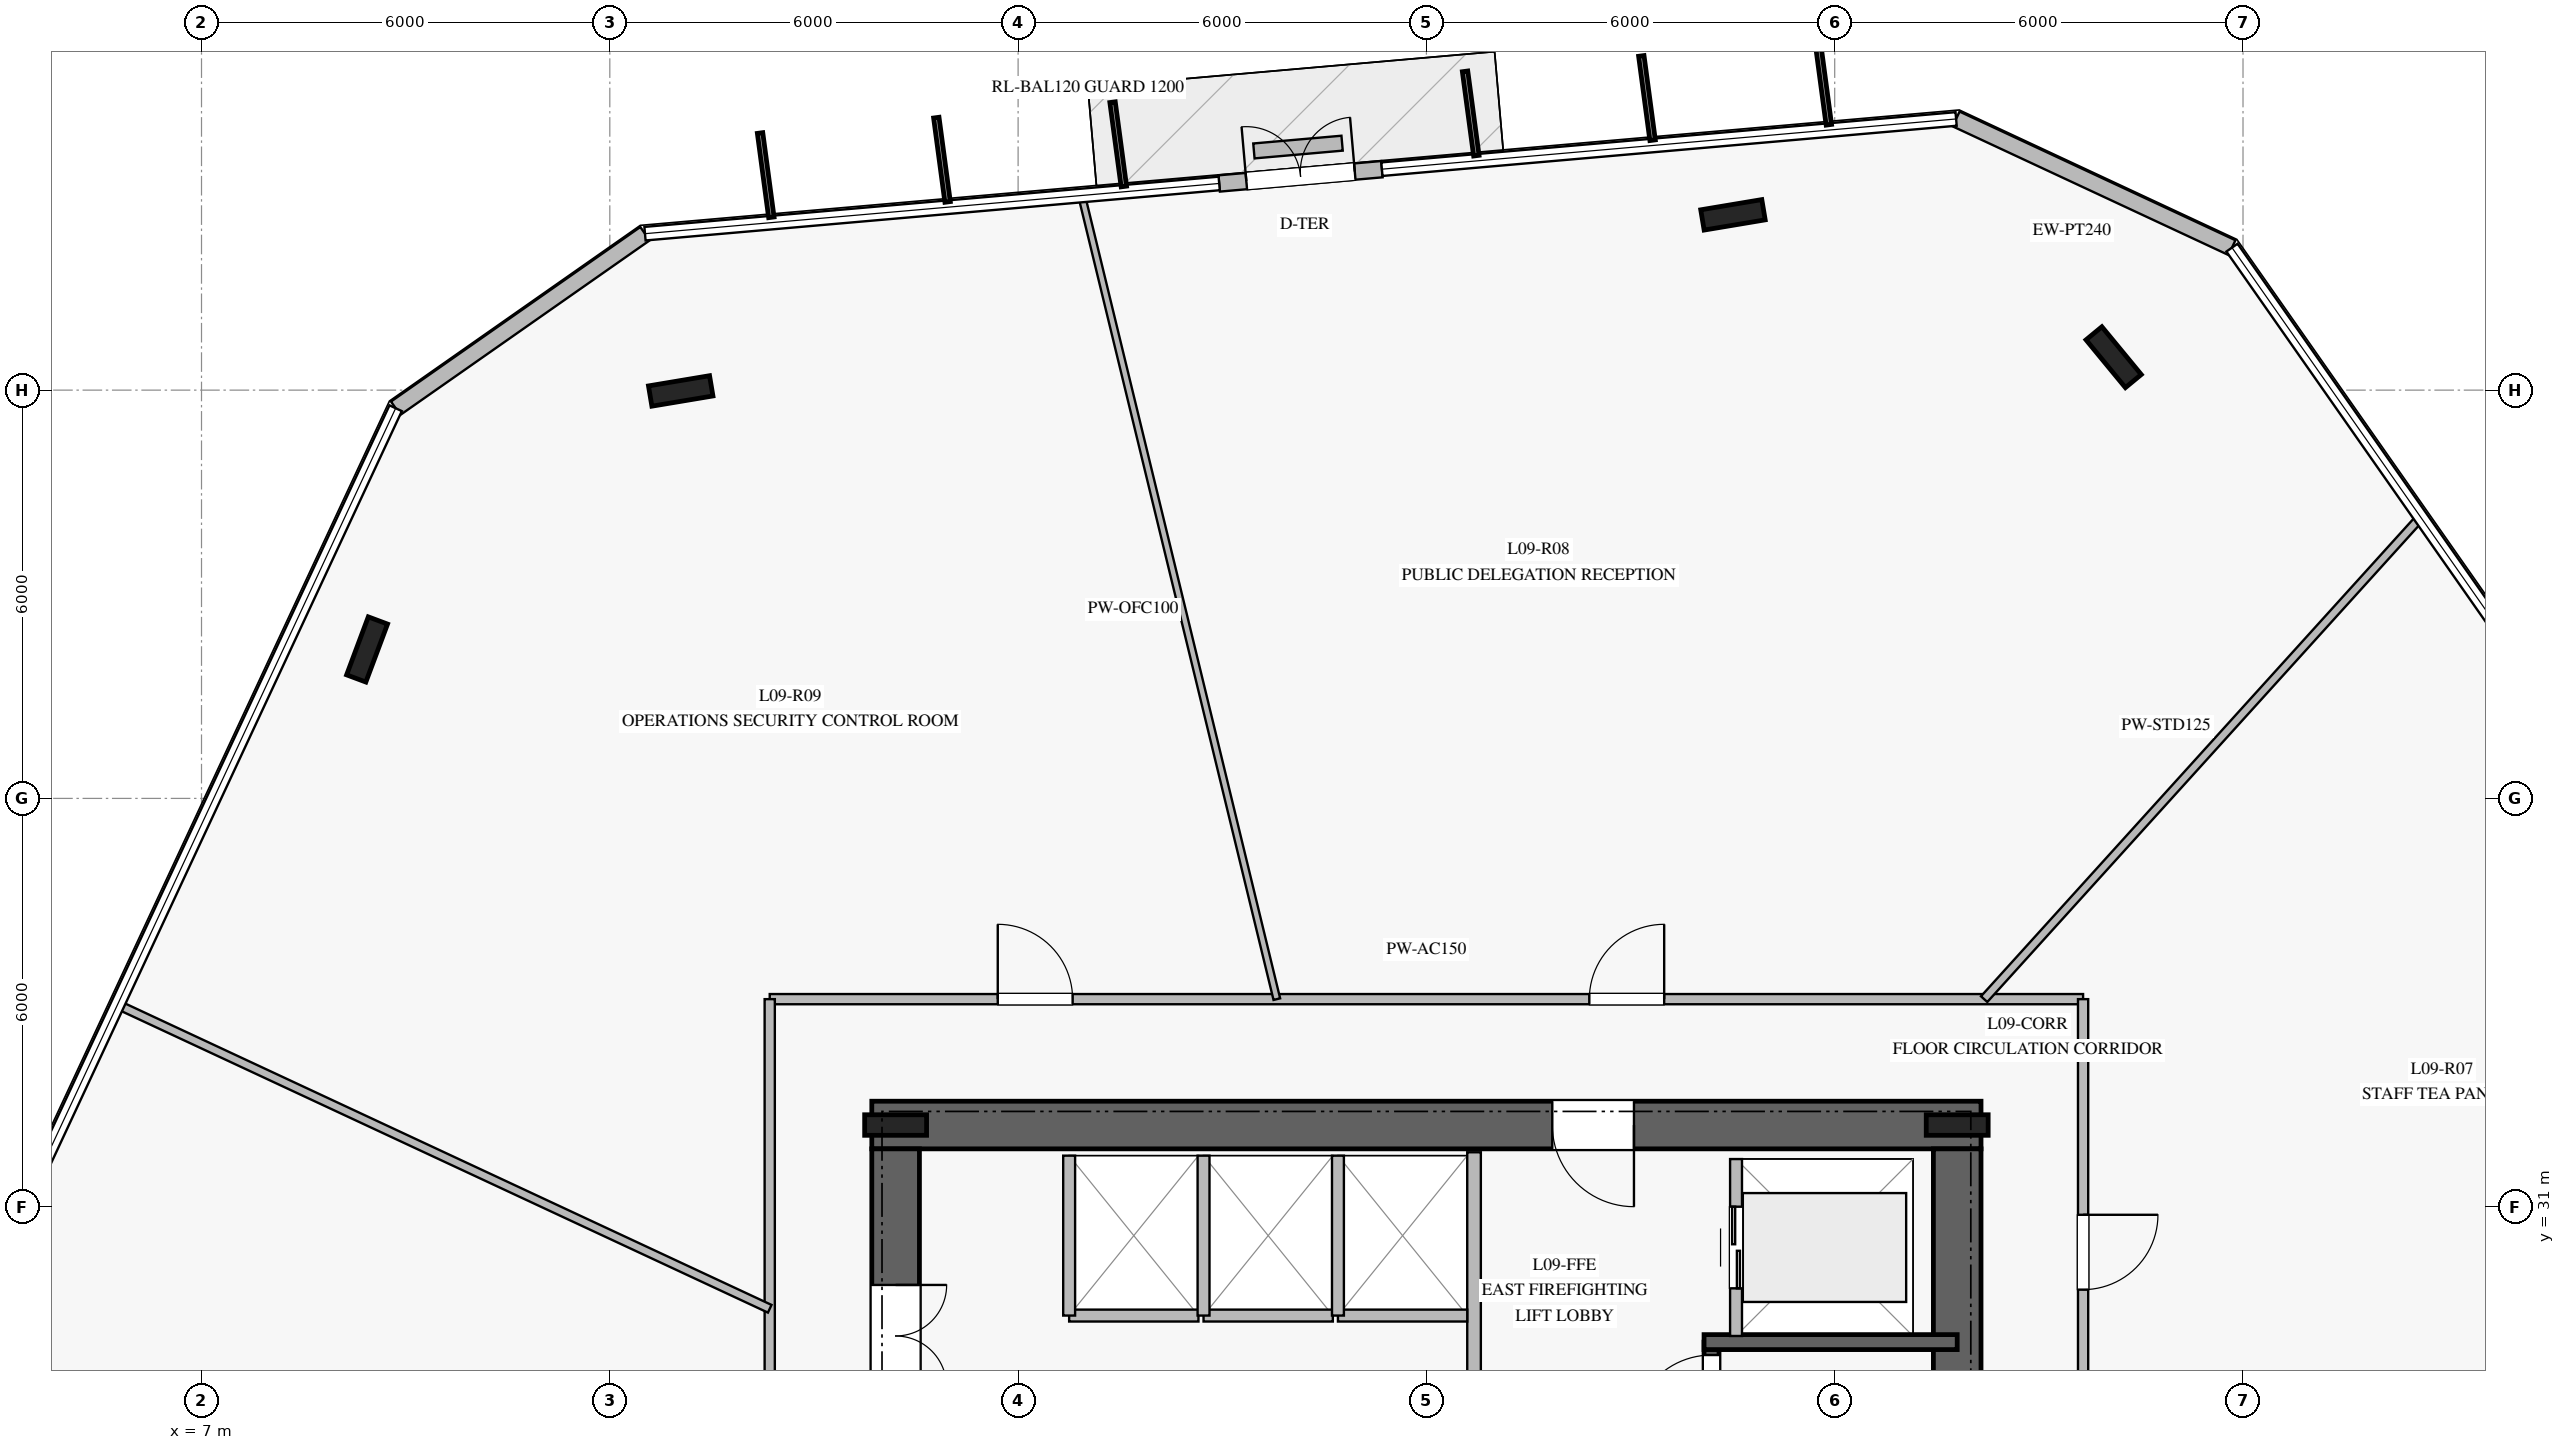
"""IFC4 building model, lengths in metres.
Left out: names, types, materials, properties, quantities, classifications, styles, units other than length and angle.
Written with IfcOpenShell. Run it as: python <this file> out.ifc"""

import sys

from ifc_helpers import new_model, si_unit, direction, frame, frame_2d, origin, origin_2d, place, context, subcontext, project, spatial, rectangle, i_section, extrude, element, fill, save


model = new_model("IFC4")
c1 = context("Model", 3, precision=1e-05, world=origin(), true_north=direction((0.0, 1.0)))
c2 = subcontext(c1, "Body", "Model", "MODEL_VIEW")
j1 = project(units=[si_unit("LENGTHUNIT", "METRE"), si_unit("PLANEANGLEUNIT", "RADIAN")], contexts=[c1])
p1 = place(None, origin())
s1 = spatial("IfcSite", under=j1, at=p1, CompositionType="ELEMENT")
p2 = place(p1, origin())
s2 = spatial("IfcBuilding", under=s1, at=p2, CompositionType="ELEMENT")
p3 = place(p2, frame((0.0, 0.0, 40.0)))
s3 = spatial("IfcBuildingStorey", under=s2, at=p3, CompositionType="ELEMENT", Elevation=40.0)
p4 = place(p3, frame((33.15, 32.2, 0.0), z_axis=(0.0, 0.0, 1.0), x_axis=(-1.0, 0.0, 0.0)))
e1 = element("IfcWall", 1, at=p4, inside=s3, PredefinedType="SHEAR", context=c2, shape_type="SweptSolid", body=[
    extrude(rectangle(XDim=16.3, YDim=0.7, at=frame_2d((8.15, 0.0))), origin(), (0.0, 0.0, 1.0), 3.76),
])
p5 = place(p4, frame((5.1, 0.0, 0.0)))
e2 = element("IfcOpeningElement", 2, at=p5, cuts=e1, PredefinedType="OPENING", context=c2, shape_type="SweptSolid", body=[
    extrude(rectangle(XDim=1.2, YDim=2.25, at=frame_2d((0.6, 1.125))), frame((0.0, 0.36, 0.0), z_axis=(0.0, -1.0, 0.0), x_axis=(1.0, 0.0, 0.0)), (0.0, 0.0, 1.0), 0.72),
])
p6 = place(p3, frame((17.2, 31.85, 0.0), z_axis=(0.0, 0.0, 1.0), x_axis=(0.0, -1.0, 0.0)))
e3 = element("IfcWall", 3, at=p6, inside=s3, PredefinedType="SHEAR", context=c2, shape_type="SweptSolid", body=[
    extrude(rectangle(XDim=13.7, YDim=0.7, at=frame_2d((6.85, 0.0))), origin(), (0.0, 0.0, 1.0), 3.76),
])
p7 = place(p6, frame((2.0, 0.0, 0.0)))
e4 = element("IfcOpeningElement", 4, at=p7, cuts=e3, PredefinedType="OPENING", context=c2, shape_type="SweptSolid", body=[
    extrude(rectangle(XDim=1.5, YDim=2.2, at=frame_2d((0.75, 1.1))), frame((0.0, 0.36, 0.0), z_axis=(0.0, -1.0, 0.0), x_axis=(1.0, 0.0, 0.0)), (0.0, 0.0, 1.0), 0.72),
])
p8 = place(p3, frame((32.8, 18.15, 0.0), z_axis=(0.0, 0.0, 1.0), x_axis=(0.0, 1.0, 0.0)))
e5 = element("IfcWall", 5, at=p8, inside=s3, PredefinedType="SHEAR", context=c2, shape_type="SweptSolid", body=[
    extrude(rectangle(XDim=13.7, YDim=0.7, at=frame_2d((6.85, 0.0))), origin(), (0.0, 0.0, 1.0), 3.76),
])
for number, where, z_axis, x_axis in (
    (6, (32.8, 32.2, 0.0), (0.0, 0.0, 1.0), (1.0, 0.0, 0.0)),
    (7, (17.2, 32.2, 0.0), (0.0, 0.0, 1.0), (1.0, 0.0, 0.0)),
):
    element("IfcColumn", number, at=place(p3, frame(where, z_axis=z_axis, x_axis=x_axis)), inside=s3, PredefinedType="COLUMN", context=c2, shape_type="SweptSolid", body=[
        extrude(i_section(OverallWidth=0.302, OverallDepth=0.91, WebThickness=0.021, FlangeThickness=0.04, at=origin_2d()), origin(), (0.0, 0.0, 1.0), 4.0),
    ])
p9 = place(p3, frame((29.19, 21.79, 0.0), z_axis=(0.0, 0.0, 1.0), x_axis=(0.0, 1.0, 0.0)))
e8 = element("IfcWall", 8, at=p9, inside=s3, PredefinedType="SOLIDWALL", context=c2, shape_type="SweptSolid", body=[
    extrude(rectangle(XDim=7.22, YDim=0.22, at=frame_2d((3.61, 0.0))), origin(), (0.0, 0.0, 1.0), 3.76),
])
p10 = place(p9, frame((5.88, 0.0, 0.0)))
e9 = element("IfcOpeningElement", 9, at=p10, cuts=e8, PredefinedType="OPENING", context=c2, shape_type="SweptSolid", body=[
    extrude(rectangle(XDim=1.15, YDim=2.2, at=frame_2d((0.575, 1.1))), frame((0.0, 0.12, 0.0), z_axis=(0.0, -1.0, 0.0), x_axis=(1.0, 0.0, 0.0)), (0.0, 0.0, 1.0), 0.24),
])
p11 = place(p3, frame((29.08, 29.01, 0.0), z_axis=(0.0, 0.0, 1.0), x_axis=(1.0, 0.0, 0.0)))
e10 = element("IfcWall", 10, at=p11, inside=s3, PredefinedType="SOLIDWALL", context=c2, shape_type="SweptSolid", body=[
    extrude(rectangle(XDim=3.72, YDim=0.22, at=frame_2d((1.86, 0.0))), origin(), (0.0, 0.0, 1.0), 3.76),
])
for number, where, z_axis, x_axis in (
    (11, (35.099, 43.484, 0.0), (0.0, 0.0, 1.0), (-0.636, 0.772, 0.0)),
    (12, (29.505, 45.576, 0.0), (0.0, 0.0, 1.0), (0.986, 0.165, 0.0)),
    (13, (14.042, 42.988, 0.0), (0.0, 0.0, 1.0), (0.986, 0.165, 0.0)),
    (14, (9.433, 39.189, 0.0), (0.0, 0.0, 1.0), (0.35, 0.937, 0.0)),
):
    element("IfcColumn", number, at=place(p3, frame(where, z_axis=z_axis, x_axis=x_axis)), inside=s3, PredefinedType="COLUMN", context=c2, shape_type="SweptSolid", body=[
        extrude(i_section(OverallWidth=0.302, OverallDepth=0.91, WebThickness=0.021, FlangeThickness=0.04, at=origin_2d()), origin(), (0.0, 0.0, 1.0), 4.0),
    ])
p12 = place(p3, frame((36.838, 45.094, 0.0), z_axis=(0.0, 0.0, 1.0), x_axis=(-0.906245873292, 0.422751010811, 0.0)))
e15 = element("IfcWall", 15, at=p12, inside=s3, PredefinedType="STANDARD", context=c2, shape_type="SweptSolid", body=[
    extrude(rectangle(XDim=4.473, YDim=0.24, at=frame_2d((2.237, 0.0))), origin(), (0.0, 0.0, 1.0), 3.76),
])
p13 = place(p3, frame((24.346, 46.247, 0.0), z_axis=(0.0, 0.0, 1.0), x_axis=(-0.996166175014, -0.087481150874, 0.0)))
e16 = element("IfcWall", 16, at=p13, inside=s3, PredefinedType="STANDARD", context=c2, shape_type="SweptSolid", body=[
    extrude(rectangle(XDim=2.4, YDim=0.24, at=frame_2d((1.2, 0.0))), origin(), (0.0, 0.0, 1.0), 3.76),
])
p14 = place(p13, frame((0.4, 0.0, 0.0)))
e17 = element("IfcOpeningElement", 17, at=p14, cuts=e16, PredefinedType="OPENING", context=c2, shape_type="SweptSolid", body=[
    extrude(rectangle(XDim=1.6, YDim=2.25, at=frame_2d((0.8, 1.125))), frame((0.0, 0.13, 0.0), z_axis=(0.0, -1.0, 0.0), x_axis=(1.0, 0.0, 0.0)), (0.0, 0.0, 1.0), 0.26),
])
p15 = place(p3, frame((13.517, 45.299, 0.0), z_axis=(0.0, 0.0, 1.0), x_axis=(-0.819196018056, -0.573513630178, 0.0)))
e18 = element("IfcWall", 18, at=p15, inside=s3, PredefinedType="STANDARD", context=c2, shape_type="SweptSolid", body=[
    extrude(rectangle(XDim=4.473, YDim=0.24, at=frame_2d((2.236, 0.0))), origin(), (0.0, 0.0, 1.0), 3.76),
])
p16 = place(p3, frame((23.761, 46.629, 0.0), z_axis=(0.0, 0.0, 1.0), x_axis=(-0.996152048595, -0.087641862602, 0.0)))
e19 = element("IfcWall", 19, at=p16, inside=s3, PredefinedType="USERDEFINED", context=c2, shape_type="SweptSolid", body=[
    extrude(rectangle(XDim=1.301, YDim=0.22, at=frame_2d((0.65, 0.0))), origin(), (0.0, 0.0, 1.0), 0.4),
])
p17 = place(p3, frame((25.7, 26.65, 0.0), z_axis=(0.0, 0.0, 1.0), x_axis=(0.0, 1.0, 0.0)))
e20 = element("IfcWall", 20, at=p17, inside=s3, PredefinedType="PARTITIONING", context=c2, shape_type="SweptSolid", body=[
    extrude(rectangle(XDim=5.15, YDim=0.2, at=frame_2d((2.575, 0.0))), origin(), (0.0, 0.0, 1.0), 3.76),
])
p18 = place(p3, frame((19.75, 29.4, 0.0), z_axis=(0.0, 0.0, 1.0), x_axis=(1.0, 0.0, 0.0)))
e21 = element("IfcWall", 21, at=p18, inside=s3, PredefinedType="PARTITIONING", context=c2, shape_type="SweptSolid", body=[
    extrude(rectangle(XDim=1.9, YDim=0.175, at=frame_2d((0.95, 0.0))), origin(), (0.0, 0.0, 1.0), 3.76),
])
p19 = place(p3, frame((19.75, 29.4, 0.0), z_axis=(0.0, 0.0, 1.0), x_axis=(0.0, 1.0, 0.0)))
e22 = element("IfcWall", 22, at=p19, inside=s3, PredefinedType="PARTITIONING", context=c2, shape_type="SweptSolid", body=[
    extrude(rectangle(XDim=2.35, YDim=0.175, at=frame_2d((1.175, 0.0))), origin(), (0.0, 0.0, 1.0), 3.76),
])
p20 = place(p3, frame((21.725, 29.4, 0.0), z_axis=(0.0, 0.0, 1.0), x_axis=(1.0, 0.0, 0.0)))
e23 = element("IfcWall", 23, at=p20, inside=s3, PredefinedType="PARTITIONING", context=c2, shape_type="SweptSolid", body=[
    extrude(rectangle(XDim=1.9, YDim=0.175, at=frame_2d((0.95, 0.0))), origin(), (0.0, 0.0, 1.0), 3.76),
])
p21 = place(p3, frame((21.725, 29.4, 0.0), z_axis=(0.0, 0.0, 1.0), x_axis=(0.0, 1.0, 0.0)))
e24 = element("IfcWall", 24, at=p21, inside=s3, PredefinedType="PARTITIONING", context=c2, shape_type="SweptSolid", body=[
    extrude(rectangle(XDim=2.35, YDim=0.175, at=frame_2d((1.175, 0.0))), origin(), (0.0, 0.0, 1.0), 3.76),
])
p22 = place(p3, frame((23.7, 29.4, 0.0), z_axis=(0.0, 0.0, 1.0), x_axis=(1.0, 0.0, 0.0)))
e25 = element("IfcWall", 25, at=p22, inside=s3, PredefinedType="PARTITIONING", context=c2, shape_type="SweptSolid", body=[
    extrude(rectangle(XDim=1.9, YDim=0.175, at=frame_2d((0.95, 0.0))), origin(), (0.0, 0.0, 1.0), 3.76),
])
p23 = place(p3, frame((23.7, 29.4, 0.0), z_axis=(0.0, 0.0, 1.0), x_axis=(0.0, 1.0, 0.0)))
e26 = element("IfcWall", 26, at=p23, inside=s3, PredefinedType="PARTITIONING", context=c2, shape_type="SweptSolid", body=[
    extrude(rectangle(XDim=2.35, YDim=0.175, at=frame_2d((1.175, 0.0))), origin(), (0.0, 0.0, 1.0), 3.76),
])
p24 = place(p3, frame((29.55, 29.1, 0.0), z_axis=(0.0, 0.0, 1.0), x_axis=(0.0, 1.0, 0.0)))
e27 = element("IfcWall", 27, at=p24, inside=s3, PredefinedType="PARTITIONING", context=c2, shape_type="SweptSolid", body=[
    extrude(rectangle(XDim=2.6, YDim=0.175, at=frame_2d((1.3, 0.0))), origin(), (0.0, 0.0, 1.0), 3.76),
])
p25 = place(p24, frame((0.7, 0.0, 0.0)))
e28 = element("IfcOpeningElement", 28, at=p25, cuts=e27, PredefinedType="OPENING", context=c2, shape_type="SweptSolid", body=[
    extrude(rectangle(XDim=1.2, YDim=2.2, at=frame_2d((0.6, 1.1))), frame((0.0, 0.098, 0.0), z_axis=(0.0, -1.0, 0.0), x_axis=(1.0, 0.0, 0.0)), (0.0, 0.0, 1.0), 0.195),
])
p26 = place(p3, frame((15.35, 34.05, 0.0), z_axis=(0.0, 0.0, 1.0), x_axis=(1.0, 0.0, 0.0)))
e29 = element("IfcWall", 29, at=p26, inside=s3, PredefinedType="PARTITIONING", context=c2, shape_type="SweptSolid", body=[
    extrude(rectangle(XDim=19.3, YDim=0.15, at=frame_2d((9.65, 0.0))), origin(), (0.0, 0.0, 1.0), 3.21),
])
p27 = place(p26, frame((12.044, 0.0, 0.0)))
e30 = element("IfcOpeningElement", 30, at=p27, cuts=e29, PredefinedType="OPENING", context=c2, shape_type="SweptSolid", body=[
    extrude(rectangle(XDim=1.1, YDim=2.2, at=frame_2d((0.55, 1.1))), frame((0.0, 0.085, 0.0), z_axis=(0.0, -1.0, 0.0), x_axis=(1.0, 0.0, 0.0)), (0.0, 0.0, 1.0), 0.17),
])
p28 = place(p26, frame((3.351, 0.0, 0.0)))
e31 = element("IfcOpeningElement", 31, at=p28, cuts=e29, PredefinedType="OPENING", context=c2, shape_type="SweptSolid", body=[
    extrude(rectangle(XDim=1.1, YDim=2.2, at=frame_2d((0.55, 1.1))), frame((0.0, 0.085, 0.0), z_axis=(0.0, -1.0, 0.0), x_axis=(1.0, 0.0, 0.0)), (0.0, 0.0, 1.0), 0.17),
])
p29 = place(p3, frame((34.65, 34.05, 0.0), z_axis=(0.0, 0.0, 1.0), x_axis=(0.0, -1.0, 0.0)))
e32 = element("IfcWall", 32, at=p29, inside=s3, PredefinedType="PARTITIONING", context=c2, shape_type="SweptSolid", body=[
    extrude(rectangle(XDim=18.1, YDim=0.15, at=frame_2d((9.05, 0.0))), origin(), (0.0, 0.0, 1.0), 3.21),
])
p30 = place(p29, frame((11.291, 0.0, 0.0)))
e33 = element("IfcOpeningElement", 33, at=p30, cuts=e32, PredefinedType="OPENING", context=c2, shape_type="SweptSolid", body=[
    extrude(rectangle(XDim=1.1, YDim=2.2, at=frame_2d((0.55, 1.1))), frame((0.0, 0.085, 0.0), z_axis=(0.0, -1.0, 0.0), x_axis=(1.0, 0.0, 0.0)), (0.0, 0.0, 1.0), 0.17),
])
p31 = place(p29, frame((3.169, 0.0, 0.0)))
e34 = element("IfcOpeningElement", 34, at=p31, cuts=e32, PredefinedType="OPENING", context=c2, shape_type="SweptSolid", body=[
    extrude(rectangle(XDim=1.1, YDim=2.2, at=frame_2d((0.55, 1.1))), frame((0.0, 0.085, 0.0), z_axis=(0.0, -1.0, 0.0), x_axis=(1.0, 0.0, 0.0)), (0.0, 0.0, 1.0), 0.17),
])
p32 = place(p3, frame((15.35, 15.95, 0.0), z_axis=(0.0, 0.0, 1.0), x_axis=(0.0, 1.0, 0.0)))
e35 = element("IfcWall", 35, at=p32, inside=s3, PredefinedType="PARTITIONING", context=c2, shape_type="SweptSolid", body=[
    extrude(rectangle(XDim=18.1, YDim=0.15, at=frame_2d((9.05, 0.0))), origin(), (0.0, 0.0, 1.0), 3.21),
])
p33 = place(p32, frame((8.447, 0.0, 0.0)))
e36 = element("IfcOpeningElement", 36, at=p33, cuts=e35, PredefinedType="OPENING", context=c2, shape_type="SweptSolid", body=[
    extrude(rectangle(XDim=1.1, YDim=2.2, at=frame_2d((0.55, 1.1))), frame((0.0, 0.085, 0.0), z_axis=(0.0, -1.0, 0.0), x_axis=(1.0, 0.0, 0.0)), (0.0, 0.0, 1.0), 0.17),
])
p34 = place(p3, frame((33.196, 34.05, 0.0), z_axis=(0.0, 0.0, 1.0), x_axis=(0.671279167316, 0.741204613806, 0.0)))
e37 = element("IfcWall", 37, at=p34, inside=s3, PredefinedType="PARTITIONING", context=c2, shape_type="SweptSolid", body=[
    extrude(rectangle(XDim=9.539, YDim=0.125, at=frame_2d((4.769, 0.0))), origin(), (0.0, 0.0, 1.0), 3.05),
])
p35 = place(p3, frame((22.802, 34.05, 0.0), z_axis=(0.0, 0.0, 1.0), x_axis=(-0.236073856764, 0.971735115221, 0.0)))
e38 = element("IfcWall", 38, at=p35, inside=s3, PredefinedType="MOVABLE", context=c2, shape_type="SweptSolid", body=[
    extrude(rectangle(XDim=12.136, YDim=0.1, at=frame_2d((6.068, 0.0))), origin(), (0.0, 0.0, 1.0), 3.06),
])
p36 = place(p3, frame((15.35, 29.5, 0.0), z_axis=(0.0, 0.0, 1.0), x_axis=(-0.906299491234, 0.42263605169, 0.0)))
e39 = element("IfcWall", 39, at=p36, inside=s3, PredefinedType="PARTITIONING", context=c2, shape_type="SweptSolid", body=[
    extrude(rectangle(XDim=10.557, YDim=0.125, at=frame_2d((5.279, 0.0))), origin(), (0.0, 0.0, 1.0), 3.06),
])
p37 = place(p3, frame((34.65, 26.789, 0.0), z_axis=(0.0, 0.0, 1.0), x_axis=(0.983241891736, 0.182305738625, 0.0)))
e40 = element("IfcWall", 40, at=p37, inside=s3, PredefinedType="PARTITIONING", context=c2, shape_type="SweptSolid", body=[
    extrude(rectangle(XDim=13.488, YDim=0.125, at=frame_2d((6.744, 0.0))), origin(), (0.0, 0.0, 1.0), 3.06),
])
p38 = place(p14, frame((1.6, 0.0, 0.0), z_axis=(0.0, 0.0, 1.0), x_axis=(-1.0, 0.0, 0.0)))
e41 = element("IfcDoor", 41, at=p38, inside=s3, OperationType="DOUBLE_DOOR_SINGLE_SWING", PredefinedType="DOOR", context=c2, shape_type="SweptSolid", body=[
    extrude(rectangle(XDim=1.6, YDim=2.25, at=frame_2d((0.8, 1.125))), frame((0.0, 0.025, 0.0), z_axis=(0.0, -1.0, 0.0), x_axis=(1.0, 0.0, 0.0)), (0.0, 0.0, 1.0), 0.05),
])
fill(e17, e41)
p39 = place(p10, origin())
e42 = element("IfcDoor", 42, at=p39, inside=s3, OperationType="SINGLE_SWING_LEFT", PredefinedType="DOOR", context=c2, shape_type="SweptSolid", body=[
    extrude(rectangle(XDim=1.15, YDim=2.2, at=frame_2d((0.575, 1.1))), frame((0.0, 0.025, 0.0), z_axis=(0.0, -1.0, 0.0), x_axis=(1.0, 0.0, 0.0)), (0.0, 0.0, 1.0), 0.05),
])
fill(e9, e42)
p40 = place(p5, origin())
e43 = element("IfcDoor", 43, at=p40, inside=s3, OperationType="SINGLE_SWING_LEFT", PredefinedType="DOOR", context=c2, shape_type="SweptSolid", body=[
    extrude(rectangle(XDim=1.2, YDim=2.25, at=frame_2d((0.6, 1.125))), frame((0.0, 0.025, 0.0), z_axis=(0.0, -1.0, 0.0), x_axis=(1.0, 0.0, 0.0)), (0.0, 0.0, 1.0), 0.05),
])
fill(e2, e43)
p41 = place(p7, origin())
e44 = element("IfcDoor", 44, at=p41, inside=s3, OperationType="DOUBLE_DOOR_SINGLE_SWING", PredefinedType="DOOR", context=c2, shape_type="SweptSolid", body=[
    extrude(rectangle(XDim=1.5, YDim=2.2, at=frame_2d((0.75, 1.1))), frame((0.0, 0.025, 0.0), z_axis=(0.0, -1.0, 0.0), x_axis=(1.0, 0.0, 0.0)), (0.0, 0.0, 1.0), 0.05),
])
fill(e4, e44)
p42 = place(p25, origin())
e45 = element("IfcDoor", 45, at=p42, inside=s3, OperationType="DOUBLE_DOOR_SLIDING", PredefinedType="DOOR", context=c2, shape_type="SweptSolid", body=[
    extrude(rectangle(XDim=1.2, YDim=2.2, at=frame_2d((0.6, 1.1))), frame((0.0, 0.025, 0.0), z_axis=(0.0, -1.0, 0.0), x_axis=(1.0, 0.0, 0.0)), (0.0, 0.0, 1.0), 0.05),
])
fill(e28, e45)
p43 = place(p31, origin())
e46 = element("IfcDoor", 46, at=p43, inside=s3, OperationType="SINGLE_SWING_LEFT", PredefinedType="DOOR", context=c2, shape_type="SweptSolid", body=[
    extrude(rectangle(XDim=1.1, YDim=2.2, at=frame_2d((0.55, 1.1))), frame((0.0, 0.025, 0.0), z_axis=(0.0, -1.0, 0.0), x_axis=(1.0, 0.0, 0.0)), (0.0, 0.0, 1.0), 0.05),
])
fill(e34, e46)
p44 = place(p27, origin())
e47 = element("IfcDoor", 47, at=p44, inside=s3, OperationType="SINGLE_SWING_RIGHT", PredefinedType="DOOR", context=c2, shape_type="SweptSolid", body=[
    extrude(rectangle(XDim=1.1, YDim=2.2, at=frame_2d((0.55, 1.1))), frame((0.0, 0.025, 0.0), z_axis=(0.0, -1.0, 0.0), x_axis=(1.0, 0.0, 0.0)), (0.0, 0.0, 1.0), 0.05),
])
fill(e30, e47)
p45 = place(p28, origin())
e48 = element("IfcDoor", 48, at=p45, inside=s3, OperationType="SINGLE_SWING_LEFT", PredefinedType="DOOR", context=c2, shape_type="SweptSolid", body=[
    extrude(rectangle(XDim=1.1, YDim=2.2, at=frame_2d((0.55, 1.1))), frame((0.0, 0.025, 0.0), z_axis=(0.0, -1.0, 0.0), x_axis=(1.0, 0.0, 0.0)), (0.0, 0.0, 1.0), 0.05),
])
fill(e31, e48)
save(model, sys.argv[1])
